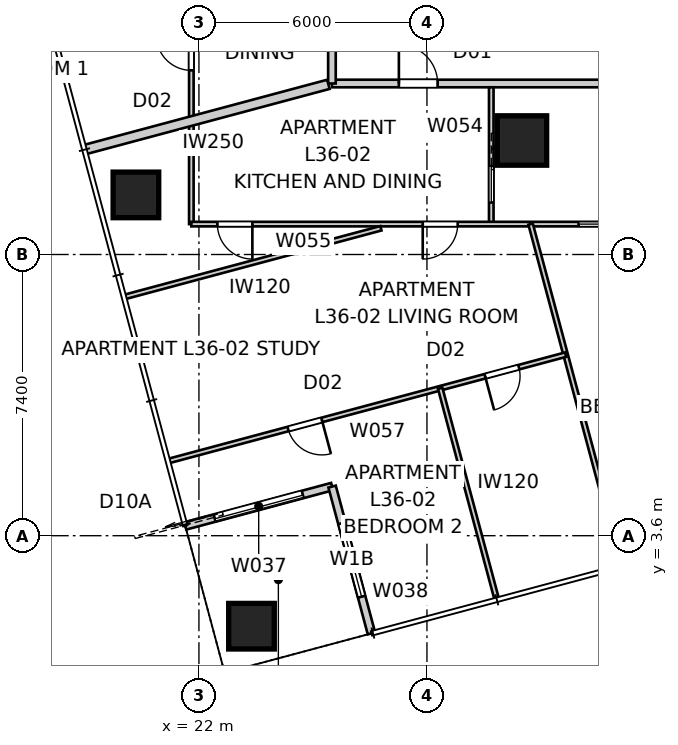
"""IFC4 building model, lengths in metres.
Left out: names, types, materials, properties, quantities, classifications, styles, units other than length and angle.
Written with IfcOpenShell. Run it as: python <this file> out.ifc"""

import sys

from ifc_helpers import new_model, si_unit, direction, frame, frame_2d, origin, origin_2d, place, context, subcontext, project, spatial, rectangle, extrude, element, fill, save


model = new_model("IFC4")
c1 = context("Model", 3, precision=1e-05, world=origin(), true_north=direction((0.0, 1.0)))
c2 = subcontext(c1, "Body", "Model", "MODEL_VIEW")
j1 = project(units=[si_unit("LENGTHUNIT", "METRE"), si_unit("PLANEANGLEUNIT", "RADIAN")], contexts=[c1])
p1 = place(None, origin())
s1 = spatial("IfcSite", under=j1, at=p1, CompositionType="ELEMENT")
p2 = place(p1, origin())
s2 = spatial("IfcBuilding", under=s1, at=p2, CompositionType="ELEMENT")
p3 = place(p2, frame((0.0, 0.0, 132.0)))
s3 = spatial("IfcBuildingStorey", under=s2, at=p3, CompositionType="ELEMENT", Elevation=132.0)
for number, where, z_axis, x_axis in (
    (1, (23.383, 1.219, 0.0), (0.0, 0.0, 1.0), (1.0, 0.0, 0.0)),
    (2, (20.342, 12.568, 0.0), (0.0, 0.0, 1.0), (1.0, 0.0, 0.0)),
):
    element("IfcColumn", number, at=place(p3, frame(where, z_axis=z_axis, x_axis=x_axis)), inside=s3, PredefinedType="COLUMN", context=c2, shape_type="SweptSolid", body=[
        extrude(rectangle(XDim=1.2, YDim=1.2, at=origin_2d()), origin(), (0.0, 0.0, 1.0), 3.4),
    ])
p4 = place(p3, frame((30.5, 14.0, 0.0), z_axis=(0.0, 0.0, 1.0), x_axis=(1.0, 0.0, 0.0)))
e3 = element("IfcColumn", 3, at=p4, inside=s3, PredefinedType="COLUMN", context=c2, shape_type="SweptSolid", body=[
    extrude(rectangle(XDim=1.3, YDim=1.3, at=origin_2d()), origin(), (0.0, 0.0, 1.0), 3.4),
])
p5 = place(p3, frame((21.641, 3.857, 0.0), z_axis=(0.0, 0.0, 1.0), x_axis=(0.965919172068, 0.258843877716, 0.0)))
e4 = element("IfcWall", 4, at=p5, inside=s3, PredefinedType="SOLIDWALL", context=c2, shape_type="SweptSolid", body=[
    extrude(rectangle(XDim=4.0, YDim=0.2, at=frame_2d((2.0, 0.0))), origin(), (0.0, 0.0, 1.0), 3.25),
])
p6 = place(p5, frame((0.8, 0.0, 0.0)))
e5 = element("IfcOpeningElement", 5, at=p6, cuts=e4, PredefinedType="OPENING", context=c2, shape_type="SweptSolid", body=[
    extrude(rectangle(XDim=2.4, YDim=2.1, at=frame_2d((1.2, 1.05))), frame((0.0, 0.11, 0.0), z_axis=(0.0, -1.0, 0.0), x_axis=(1.0, 0.0, 0.0)), (0.0, 0.0, 1.0), 0.22),
])
p7 = place(p3, frame((25.504, 4.893, 0.0), z_axis=(0.0, 0.0, 1.0), x_axis=(0.258786931944, -0.965934430412, 0.0)))
e6 = element("IfcWall", 6, at=p7, inside=s3, PredefinedType="SOLIDWALL", context=c2, shape_type="SweptSolid", body=[
    extrude(rectangle(XDim=4.0, YDim=0.2, at=frame_2d((2.0, 0.0))), origin(), (0.0, 0.0, 1.0), 3.25),
])
p8 = place(p7, frame((1.0, 0.0, 0.45)))
e7 = element("IfcOpeningElement", 7, at=p8, cuts=e6, PredefinedType="OPENING", context=c2, shape_type="SweptSolid", body=[
    extrude(rectangle(XDim=2.0, YDim=1.8, at=frame_2d((1.0, 0.9))), frame((0.0, 0.11, 0.0), z_axis=(0.0, -1.0, 0.0), x_axis=(1.0, 0.0, 0.0)), (0.0, 0.0, 1.0), 0.22),
])
p9 = place(p3, frame((25.5, 15.5, 0.0), z_axis=(0.0, 0.0, 1.0), x_axis=(1.0, 0.0, 0.0)))
e8 = element("IfcWall", 8, at=p9, inside=s3, PredefinedType="PARTITIONING", context=c2, shape_type="SweptSolid", body=[
    extrude(rectangle(XDim=29.0, YDim=0.2, at=frame_2d((14.5, 0.0))), origin(), (0.0, 0.0, 1.0), 3.25),
])
p10 = place(p9, frame((24.996, 0.0, 0.0)))
e9 = element("IfcOpeningElement", 9, at=p10, cuts=e8, PredefinedType="OPENING", context=c2, shape_type="SweptSolid", body=[
    extrude(rectangle(XDim=1.02, YDim=2.1, at=frame_2d((0.51, 1.05))), frame((0.0, 0.11, 0.0), z_axis=(0.0, -1.0, 0.0), x_axis=(1.0, 0.0, 0.0)), (0.0, 0.0, 1.0), 0.22),
])
p11 = place(p9, frame((1.761, 0.0, 0.0)))
e10 = element("IfcOpeningElement", 10, at=p11, cuts=e8, PredefinedType="OPENING", context=c2, shape_type="SweptSolid", body=[
    extrude(rectangle(XDim=1.02, YDim=2.34, at=frame_2d((0.51, 1.17))), frame((0.0, 0.11, 0.0), z_axis=(0.0, -1.0, 0.0), x_axis=(1.0, 0.0, 0.0)), (0.0, 0.0, 1.0), 0.22),
])
p12 = place(p3, frame((25.5, 43.7, 0.0), z_axis=(0.0, 0.0, 1.0), x_axis=(0.0, -1.0, 0.0)))
e11 = element("IfcWall", 11, at=p12, inside=s3, PredefinedType="PARTITIONING", context=c2, shape_type="SweptSolid", body=[
    extrude(rectangle(XDim=28.2, YDim=0.2, at=frame_2d((14.1, 0.0))), origin(), (0.0, 0.0, 1.0), 3.25),
])
p13 = place(p12, frame((24.646, 0.0, 0.0)))
e12 = element("IfcOpeningElement", 12, at=p13, cuts=e11, PredefinedType="OPENING", context=c2, shape_type="SweptSolid", body=[
    extrude(rectangle(XDim=1.02, YDim=2.1, at=frame_2d((0.51, 1.05))), frame((0.0, 0.11, 0.0), z_axis=(0.0, -1.0, 0.0), x_axis=(1.0, 0.0, 0.0)), (0.0, 0.0, 1.0), 0.22),
])
p14 = place(p12, frame((14.858, 0.0, 0.0)))
e13 = element("IfcOpeningElement", 13, at=p14, cuts=e11, PredefinedType="OPENING", context=c2, shape_type="SweptSolid", body=[
    extrude(rectangle(XDim=1.02, YDim=2.34, at=frame_2d((0.51, 1.17))), frame((0.0, 0.11, 0.0), z_axis=(0.0, -1.0, 0.0), x_axis=(1.0, 0.0, 0.0)), (0.0, 0.0, 1.0), 0.22),
])
p15 = place(p12, frame((1.347, 0.0, 0.0)))
e14 = element("IfcOpeningElement", 14, at=p15, cuts=e11, PredefinedType="OPENING", context=c2, shape_type="SweptSolid", body=[
    extrude(rectangle(XDim=1.02, YDim=2.1, at=frame_2d((0.51, 1.05))), frame((0.0, 0.11, 0.0), z_axis=(0.0, -1.0, 0.0), x_axis=(1.0, 0.0, 0.0)), (0.0, 0.0, 1.0), 0.22),
])
p16 = place(p3, frame((18.988, 13.758, 0.0), z_axis=(0.0, 0.0, 1.0), x_axis=(0.965929355837, 0.25880587229, 0.0)))
e15 = element("IfcWall", 15, at=p16, inside=s3, PredefinedType="PARTITIONING", context=c2, shape_type="SweptSolid", body=[
    extrude(rectangle(XDim=6.645, YDim=0.25, at=frame_2d((3.322, 0.0))), origin(), (0.0, 0.0, 1.0), 3.25),
])
p17 = place(p3, frame((21.8, 11.8, 0.0), z_axis=(0.0, 0.0, 1.0), x_axis=(0.0, 1.0, 0.0)))
e16 = element("IfcWall", 16, at=p17, inside=s3, PredefinedType="PARTITIONING", context=c2, shape_type="SweptSolid", body=[
    extrude(rectangle(XDim=21.116, YDim=0.12, at=frame_2d((10.558, 0.0))), origin(), (0.0, 0.0, 1.0), 3.25),
])
p18 = place(p17, frame((4.046, 0.0, 0.0)))
e17 = element("IfcOpeningElement", 17, at=p18, cuts=e16, PredefinedType="OPENING", context=c2, shape_type="SweptSolid", body=[
    extrude(rectangle(XDim=0.92, YDim=2.34, at=frame_2d((0.46, 1.17))), frame((0.0, 0.07, 0.0), z_axis=(0.0, -1.0, 0.0), x_axis=(1.0, 0.0, 0.0)), (0.0, 0.0, 1.0), 0.14),
])
p19 = place(p17, frame((7.358, 0.0, 0.0)))
e18 = element("IfcOpeningElement", 18, at=p19, cuts=e16, PredefinedType="OPENING", context=c2, shape_type="SweptSolid", body=[
    extrude(rectangle(XDim=0.92, YDim=2.34, at=frame_2d((0.46, 1.17))), frame((0.0, 0.07, 0.0), z_axis=(0.0, -1.0, 0.0), x_axis=(1.0, 0.0, 0.0)), (0.0, 0.0, 1.0), 0.14),
])
p20 = place(p17, frame((14.958, 0.0, 0.0)))
e19 = element("IfcOpeningElement", 19, at=p20, cuts=e16, PredefinedType="OPENING", context=c2, shape_type="SweptSolid", body=[
    extrude(rectangle(XDim=0.92, YDim=2.34, at=frame_2d((0.46, 1.17))), frame((0.0, 0.07, 0.0), z_axis=(0.0, -1.0, 0.0), x_axis=(1.0, 0.0, 0.0)), (0.0, 0.0, 1.0), 0.14),
])
p21 = place(p17, frame((17.31, 0.0, 0.0)))
e20 = element("IfcOpeningElement", 20, at=p21, cuts=e16, PredefinedType="OPENING", context=c2, shape_type="SweptSolid", body=[
    extrude(rectangle(XDim=0.92, YDim=2.34, at=frame_2d((0.46, 1.17))), frame((0.0, 0.07, 0.0), z_axis=(0.0, -1.0, 0.0), x_axis=(1.0, 0.0, 0.0)), (0.0, 0.0, 1.0), 0.14),
])
p22 = place(p3, frame((29.692, 15.4, 0.0), z_axis=(0.0, 0.0, 1.0), x_axis=(0.0, -1.0, 0.0)))
e21 = element("IfcWall", 21, at=p22, inside=s3, PredefinedType="PARTITIONING", context=c2, shape_type="SweptSolid", body=[
    extrude(rectangle(XDim=3.6, YDim=0.12, at=frame_2d((1.8, 0.0))), origin(), (0.0, 0.0, 1.0), 3.25),
])
p23 = place(p22, frame((2.07, 0.0, 0.0)))
e22 = element("IfcOpeningElement", 22, at=p23, cuts=e21, PredefinedType="OPENING", context=c2, shape_type="SweptSolid", body=[
    extrude(rectangle(XDim=0.96, YDim=2.1, at=frame_2d((0.48, 1.05))), frame((0.0, 0.07, 0.0), z_axis=(0.0, -1.0, 0.0), x_axis=(1.0, 0.0, 0.0)), (0.0, 0.0, 1.0), 0.14),
])
p24 = place(p3, frame((34.7, 11.8, 0.0), z_axis=(0.0, 0.0, 1.0), x_axis=(-1.0, 0.0, 0.0)))
e23 = element("IfcWall", 23, at=p24, inside=s3, PredefinedType="PARTITIONING", context=c2, shape_type="SweptSolid", body=[
    extrude(rectangle(XDim=12.9, YDim=0.12, at=frame_2d((6.45, 0.0))), origin(), (0.0, 0.0, 1.0), 2.637),
])
p25 = place(p24, frame((11.294, 0.0, 0.0)))
e24 = element("IfcOpeningElement", 24, at=p25, cuts=e23, PredefinedType="OPENING", context=c2, shape_type="SweptSolid", body=[
    extrude(rectangle(XDim=0.92, YDim=2.34, at=frame_2d((0.46, 1.17))), frame((0.0, 0.07, 0.0), z_axis=(0.0, -1.0, 0.0), x_axis=(1.0, 0.0, 0.0)), (0.0, 0.0, 1.0), 0.14),
])
p26 = place(p24, frame((5.891, 0.0, 0.0)))
e25 = element("IfcOpeningElement", 25, at=p26, cuts=e23, PredefinedType="OPENING", context=c2, shape_type="SweptSolid", body=[
    extrude(rectangle(XDim=0.92, YDim=2.34, at=frame_2d((0.46, 1.17))), frame((0.0, 0.07, 0.0), z_axis=(0.0, -1.0, 0.0), x_axis=(1.0, 0.0, 0.0)), (0.0, 0.0, 1.0), 0.14),
])
p27 = place(p24, frame((1.75, 0.0, 0.0)))
e26 = element("IfcOpeningElement", 26, at=p27, cuts=e23, PredefinedType="OPENING", context=c2, shape_type="SweptSolid", body=[
    extrude(rectangle(XDim=0.96, YDim=2.1, at=frame_2d((0.48, 1.05))), frame((0.0, 0.07, 0.0), z_axis=(0.0, -1.0, 0.0), x_axis=(1.0, 0.0, 0.0)), (0.0, 0.0, 1.0), 0.14),
])
p28 = place(p3, frame((30.728, 11.8, 0.0), z_axis=(0.0, 0.0, 1.0), x_axis=(0.258818491613, -0.965925974596, 0.0)))
e27 = element("IfcWall", 27, at=p28, inside=s3, PredefinedType="PARTITIONING", context=c2, shape_type="SweptSolid", body=[
    extrude(rectangle(XDim=9.28, YDim=0.12, at=frame_2d((4.64, 0.0))), origin(), (0.0, 0.0, 1.0), 2.721),
])
p29 = place(p3, frame((31.648, 8.365, 0.0), z_axis=(0.0, 0.0, 1.0), x_axis=(-0.965925636365, -0.258819753906, 0.0)))
e28 = element("IfcWall", 28, at=p29, inside=s3, PredefinedType="PARTITIONING", context=c2, shape_type="SweptSolid", body=[
    extrude(rectangle(XDim=10.793, YDim=0.12, at=frame_2d((5.396, 0.0))), origin(), (0.0, 0.0, 1.0), 3.25),
])
p30 = place(p29, frame((6.64, 0.0, 0.0)))
e29 = element("IfcOpeningElement", 29, at=p30, cuts=e28, PredefinedType="OPENING", context=c2, shape_type="SweptSolid", body=[
    extrude(rectangle(XDim=0.92, YDim=2.34, at=frame_2d((0.46, 1.17))), frame((0.0, 0.07, 0.0), z_axis=(0.0, -1.0, 0.0), x_axis=(1.0, 0.0, 0.0)), (0.0, 0.0, 1.0), 0.14),
])
p31 = place(p29, frame((1.273, 0.0, 0.0)))
e30 = element("IfcOpeningElement", 30, at=p31, cuts=e28, PredefinedType="OPENING", context=c2, shape_type="SweptSolid", body=[
    extrude(rectangle(XDim=0.92, YDim=2.34, at=frame_2d((0.46, 1.17))), frame((0.0, 0.07, 0.0), z_axis=(0.0, -1.0, 0.0), x_axis=(1.0, 0.0, 0.0)), (0.0, 0.0, 1.0), 0.14),
])
p32 = place(p3, frame((20.066, 9.889, 0.0), z_axis=(0.0, 0.0, 1.0), x_axis=(0.965925659778, 0.258819666528, 0.0)))
e31 = element("IfcWall", 31, at=p32, inside=s3, PredefinedType="PARTITIONING", context=c2, shape_type="SweptSolid", body=[
    extrude(rectangle(XDim=6.959, YDim=0.12, at=frame_2d((3.48, 0.0))), origin(), (0.0, 0.0, 1.0), 3.25),
])
p33 = place(p3, frame((28.348, 7.48, 0.0), z_axis=(0.0, 0.0, 1.0), x_axis=(0.258830607795, -0.965922728001, 0.0)))
e32 = element("IfcWall", 32, at=p33, inside=s3, PredefinedType="PARTITIONING", context=c2, shape_type="SweptSolid", body=[
    extrude(rectangle(XDim=5.724, YDim=0.12, at=frame_2d((2.862, 0.0))), origin(), (0.0, 0.0, 1.0), 3.25),
])
p34 = place(p6, origin())
e33 = element("IfcDoor", 33, at=p34, inside=s3, OperationType="SLIDING_TO_LEFT", PredefinedType="DOOR", context=c2, shape_type="SweptSolid", body=[
    extrude(rectangle(XDim=2.4, YDim=2.1, at=frame_2d((1.2, 1.05))), frame((0.0, 0.025, 0.0), z_axis=(0.0, -1.0, 0.0), x_axis=(1.0, 0.0, 0.0)), (0.0, 0.0, 1.0), 0.05),
])
fill(e5, e33)
p35 = place(p8, origin())
e34 = element("IfcWindow", 34, at=p35, inside=s3, PartitioningType="SINGLE_PANEL", PredefinedType="WINDOW", context=c2, shape_type="SweptSolid", body=[
    extrude(rectangle(XDim=2.0, YDim=1.8, at=frame_2d((1.0, 0.9))), frame((0.0, 0.03, 0.0), z_axis=(0.0, -1.0, 0.0), x_axis=(1.0, 0.0, 0.0)), (0.0, 0.0, 1.0), 0.06),
])
fill(e7, e34)
p36 = place(p11, origin())
e35 = element("IfcDoor", 35, at=p36, inside=s3, OperationType="SINGLE_SWING_LEFT", PredefinedType="DOOR", context=c2, shape_type="SweptSolid", body=[
    extrude(rectangle(XDim=1.02, YDim=2.34, at=frame_2d((0.51, 1.17))), frame((0.0, 0.025, 0.0), z_axis=(0.0, -1.0, 0.0), x_axis=(1.0, 0.0, 0.0)), (0.0, 0.0, 1.0), 0.05),
])
fill(e10, e35)
p37 = place(p18, origin())
e36 = element("IfcDoor", 36, at=p37, inside=s3, OperationType="SINGLE_SWING_RIGHT", PredefinedType="DOOR", context=c2, shape_type="SweptSolid", body=[
    extrude(rectangle(XDim=0.92, YDim=2.34, at=frame_2d((0.46, 1.17))), frame((0.0, 0.025, 0.0), z_axis=(0.0, -1.0, 0.0), x_axis=(1.0, 0.0, 0.0)), (0.0, 0.0, 1.0), 0.05),
])
fill(e17, e36)
p38 = place(p25, origin())
e37 = element("IfcDoor", 37, at=p38, inside=s3, OperationType="SINGLE_SWING_LEFT", PredefinedType="DOOR", context=c2, shape_type="SweptSolid", body=[
    extrude(rectangle(XDim=0.92, YDim=2.34, at=frame_2d((0.46, 1.17))), frame((0.0, 0.025, 0.0), z_axis=(0.0, -1.0, 0.0), x_axis=(1.0, 0.0, 0.0)), (0.0, 0.0, 1.0), 0.05),
])
fill(e24, e37)
p39 = place(p23, origin())
e38 = element("IfcDoor", 38, at=p39, inside=s3, OperationType="SLIDING_TO_LEFT", PredefinedType="DOOR", context=c2, shape_type="SweptSolid", body=[
    extrude(rectangle(XDim=0.96, YDim=2.1, at=frame_2d((0.48, 1.05))), frame((0.0, 0.025, 0.0), z_axis=(0.0, -1.0, 0.0), x_axis=(1.0, 0.0, 0.0)), (0.0, 0.0, 1.0), 0.05),
])
fill(e22, e38)
p40 = place(p26, origin())
e39 = element("IfcDoor", 39, at=p40, inside=s3, OperationType="SINGLE_SWING_RIGHT", PredefinedType="DOOR", context=c2, shape_type="SweptSolid", body=[
    extrude(rectangle(XDim=0.92, YDim=2.34, at=frame_2d((0.46, 1.17))), frame((0.0, 0.025, 0.0), z_axis=(0.0, -1.0, 0.0), x_axis=(1.0, 0.0, 0.0)), (0.0, 0.0, 1.0), 0.05),
])
fill(e25, e39)
p41 = place(p27, origin())
e40 = element("IfcDoor", 40, at=p41, inside=s3, OperationType="SLIDING_TO_LEFT", PredefinedType="DOOR", context=c2, shape_type="SweptSolid", body=[
    extrude(rectangle(XDim=0.96, YDim=2.1, at=frame_2d((0.48, 1.05))), frame((0.0, 0.025, 0.0), z_axis=(0.0, -1.0, 0.0), x_axis=(1.0, 0.0, 0.0)), (0.0, 0.0, 1.0), 0.05),
])
fill(e26, e40)
p42 = place(p30, origin())
e41 = element("IfcDoor", 41, at=p42, inside=s3, OperationType="SINGLE_SWING_LEFT", PredefinedType="DOOR", context=c2, shape_type="SweptSolid", body=[
    extrude(rectangle(XDim=0.92, YDim=2.34, at=frame_2d((0.46, 1.17))), frame((0.0, 0.025, 0.0), z_axis=(0.0, -1.0, 0.0), x_axis=(1.0, 0.0, 0.0)), (0.0, 0.0, 1.0), 0.05),
])
fill(e29, e41)
p43 = place(p31, origin())
e42 = element("IfcDoor", 42, at=p43, inside=s3, OperationType="SINGLE_SWING_RIGHT", PredefinedType="DOOR", context=c2, shape_type="SweptSolid", body=[
    extrude(rectangle(XDim=0.92, YDim=2.34, at=frame_2d((0.46, 1.17))), frame((0.0, 0.025, 0.0), z_axis=(0.0, -1.0, 0.0), x_axis=(1.0, 0.0, 0.0)), (0.0, 0.0, 1.0), 0.05),
])
fill(e30, e42)
save(model, sys.argv[1])
